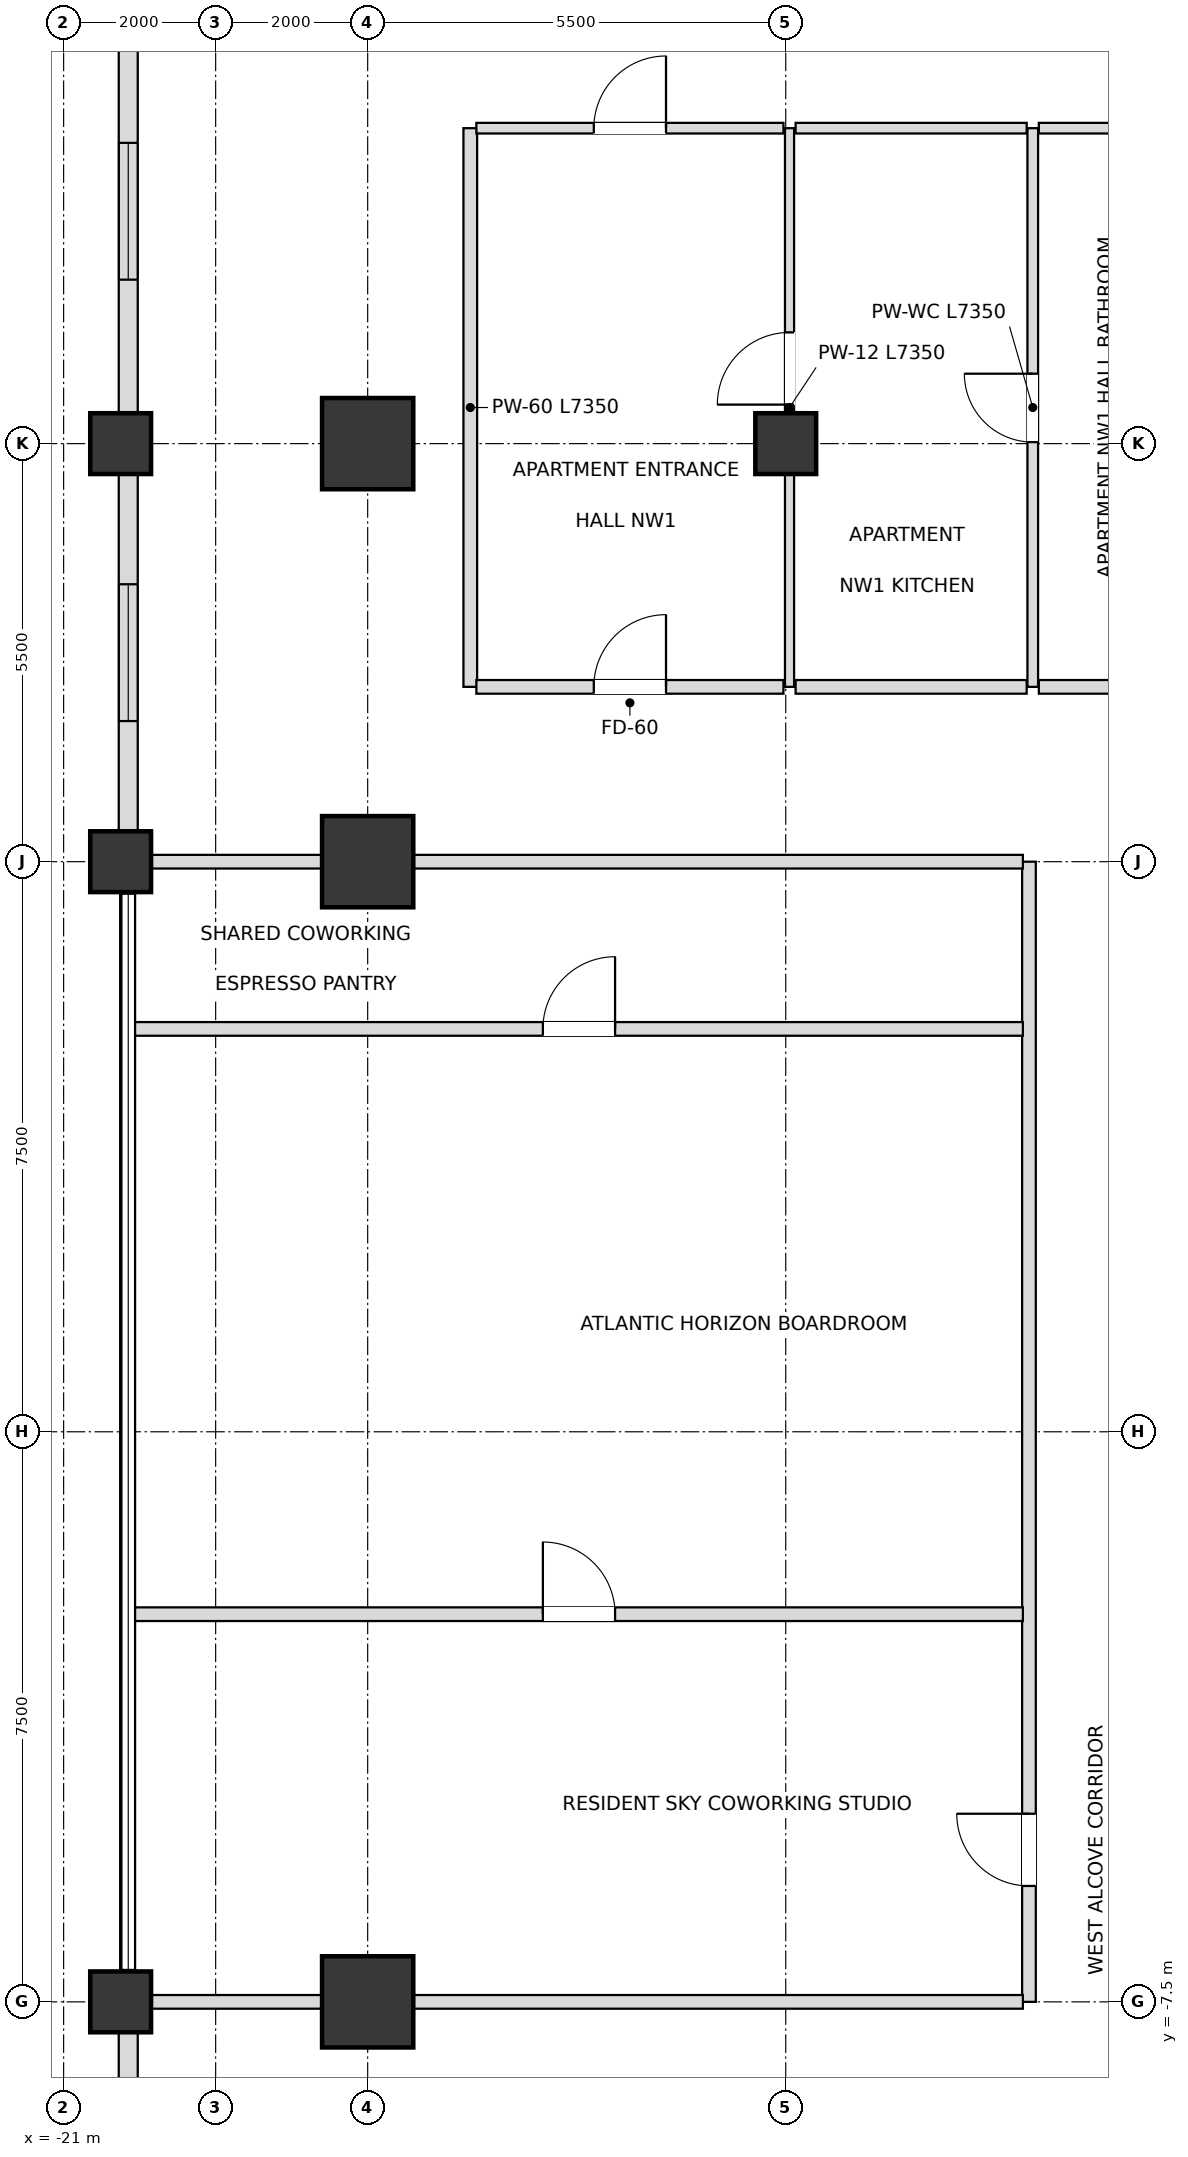
"""IFC4 building model, lengths in metres.
Left out: names, types, materials, properties, quantities, classifications, styles, units other than length and angle.
Written with IfcOpenShell. Run it as: python <this file> out.ifc"""

import sys

from ifc_helpers import new_model, si_unit, direction, frame, frame_2d, origin, origin_2d, place, context, subcontext, project, spatial, rectangle, extrude, element, fill, save


model = new_model("IFC4")
c1 = context("Model", 3, precision=1e-05, world=origin(), true_north=direction((0.0, 1.0)))
c2 = subcontext(c1, "Body", "Model", "MODEL_VIEW")
j1 = project(units=[si_unit("LENGTHUNIT", "METRE"), si_unit("PLANEANGLEUNIT", "RADIAN")], contexts=[c1])
p1 = place(None, origin())
s1 = spatial("IfcSite", under=j1, at=p1, CompositionType="ELEMENT")
p2 = place(p1, origin())
s2 = spatial("IfcBuilding", under=s1, at=p2, CompositionType="ELEMENT")
p3 = place(p2, frame((0.0, 0.0, 147.6)))
s3 = spatial("IfcBuildingStorey", under=s2, at=p3, CompositionType="ELEMENT", Elevation=147.6)
for number, where, z_axis, x_axis in (
    (1, (-17.0, 13.0, 0.0), (0.0, 0.0, 1.0), (1.0, 0.0, 0.0)),
    (2, (-17.0, 7.5, 0.0), (0.0, 0.0, 1.0), (1.0, 0.0, 0.0)),
    (3, (-17.0, -7.5, 0.0), (0.0, 0.0, 1.0), (1.0, 0.0, 0.0)),
):
    element("IfcColumn", number, at=place(p3, frame(where, z_axis=z_axis, x_axis=x_axis)), inside=s3, PredefinedType="USERDEFINED", context=c2, shape_type="SweptSolid", body=[
        extrude(rectangle(XDim=1.2, YDim=1.2, at=origin_2d()), origin(), (0.0, 0.0, 1.0), 3.6),
    ])
for number, where, z_axis, x_axis in (
    (4, (-11.5, 13.0, 0.0), (0.0, 0.0, 1.0), (1.0, 0.0, 0.0)),
    (5, (-20.25, -7.5, 0.0), (0.0, 0.0, 1.0), (1.0, 0.0, 0.0)),
    (6, (-20.25, 7.5, 0.0), (0.0, 0.0, 1.0), (1.0, 0.0, 0.0)),
    (7, (-20.25, 13.0, 0.0), (0.0, 0.0, 1.0), (1.0, 0.0, 0.0)),
):
    element("IfcColumn", number, at=place(p3, frame(where, z_axis=z_axis, x_axis=x_axis)), inside=s3, PredefinedType="COLUMN", context=c2, shape_type="SweptSolid", body=[
        extrude(rectangle(XDim=0.8, YDim=0.8, at=origin_2d()), origin(), (0.0, 0.0, 1.0), 3.6),
    ])
p4 = place(p3, frame((-20.15, 18.675, 0.0), z_axis=(0.0, 0.0, 1.0), x_axis=(0.0, -1.0, 0.0)))
e8 = element("IfcWall", 8, at=p4, inside=s3, PredefinedType="SOLIDWALL", context=c2, shape_type="SweptSolid", body=[
    extrude(rectangle(XDim=5.28, YDim=0.25, at=frame_2d((2.64, 0.0))), origin(), (0.0, 0.0, 1.0), 2.736),
])
p5 = place(p4, frame((1.718, 0.0, 0.72)))
e9 = element("IfcOpeningElement", 9, at=p5, cuts=e8, PredefinedType="OPENING", context=c2, shape_type="SweptSolid", body=[
    extrude(rectangle(XDim=1.8, YDim=1.68, at=frame_2d((0.9, 0.84))), frame((0.0, 0.135, 0.0), z_axis=(0.0, -1.0, 0.0), x_axis=(1.0, 0.0, 0.0)), (0.0, 0.0, 1.0), 0.27),
])
p6 = place(p3, frame((-20.15, 12.605, 0.0), z_axis=(0.0, 0.0, 1.0), x_axis=(0.0, -1.0, 0.0)))
e10 = element("IfcWall", 10, at=p6, inside=s3, PredefinedType="SOLIDWALL", context=c2, shape_type="SweptSolid", body=[
    extrude(rectangle(XDim=4.71, YDim=0.25, at=frame_2d((2.355, 0.0))), origin(), (0.0, 0.0, 1.0), 2.736),
])
p7 = place(p6, frame((1.455, 0.0, 0.72)))
e11 = element("IfcOpeningElement", 11, at=p7, cuts=e10, PredefinedType="OPENING", context=c2, shape_type="SweptSolid", body=[
    extrude(rectangle(XDim=1.8, YDim=1.68, at=frame_2d((0.9, 0.84))), frame((0.0, 0.135, 0.0), z_axis=(0.0, -1.0, 0.0), x_axis=(1.0, 0.0, 0.0)), (0.0, 0.0, 1.0), 0.27),
])
p8 = place(p3, frame((-20.15, -7.895, 0.0), z_axis=(0.0, 0.0, 1.0), x_axis=(0.0, -1.0, 0.0)))
e12 = element("IfcWall", 12, at=p8, inside=s3, PredefinedType="SOLIDWALL", context=c2, shape_type="SweptSolid", body=[
    extrude(rectangle(XDim=4.71, YDim=0.25, at=frame_2d((2.355, 0.0))), origin(), (0.0, 0.0, 1.0), 2.736),
])
p9 = place(p8, frame((1.455, 0.0, 0.72)))
e13 = element("IfcOpeningElement", 13, at=p9, cuts=e12, PredefinedType="OPENING", context=c2, shape_type="SweptSolid", body=[
    extrude(rectangle(XDim=1.8, YDim=1.68, at=frame_2d((0.9, 0.84))), frame((0.0, 0.135, 0.0), z_axis=(0.0, -1.0, 0.0), x_axis=(1.0, 0.0, 0.0)), (0.0, 0.0, 1.0), 0.27),
])
p10 = place(p3, frame((-15.65, 9.8, 0.0), z_axis=(0.0, 0.0, 1.0), x_axis=(0.0, 1.0, 0.0)))
e14 = element("IfcWall", 14, at=p10, inside=s3, PredefinedType="PARTITIONING", context=c2, shape_type="SweptSolid", body=[
    extrude(rectangle(XDim=7.35, YDim=0.18, at=frame_2d((3.675, 0.0))), origin(), (0.0, 0.0, 1.0), 2.736),
])
p11 = place(p3, frame((-11.45, 9.8, 0.0), z_axis=(0.0, 0.0, 1.0), x_axis=(0.0, 1.0, 0.0)))
e15 = element("IfcWall", 15, at=p11, inside=s3, PredefinedType="PARTITIONING", context=c2, shape_type="SweptSolid", body=[
    extrude(rectangle(XDim=7.35, YDim=0.12, at=frame_2d((3.675, 0.0))), origin(), (0.0, 0.0, 1.0), 2.736),
])
p12 = place(p11, frame((3.713, 0.0, 0.0)))
e16 = element("IfcOpeningElement", 16, at=p12, cuts=e15, PredefinedType="OPENING", context=c2, shape_type="SweptSolid", body=[
    extrude(rectangle(XDim=0.95, YDim=2.1, at=frame_2d((0.475, 1.05))), frame((0.0, 0.07, 0.0), z_axis=(0.0, -1.0, 0.0), x_axis=(1.0, 0.0, 0.0)), (0.0, 0.0, 1.0), 0.14),
])
p13 = place(p3, frame((-8.3, -7.5, 0.0), z_axis=(0.0, 0.0, 1.0), x_axis=(0.0, 1.0, 0.0)))
e17 = element("IfcWall", 17, at=p13, inside=s3, PredefinedType="PARTITIONING", context=c2, shape_type="SweptSolid", body=[
    extrude(rectangle(XDim=15.0, YDim=0.18, at=frame_2d((7.5, 0.0))), origin(), (0.0, 0.0, 1.0), 3.38),
])
p14 = place(p13, frame((1.525, 0.0, 0.0)))
e18 = element("IfcOpeningElement", 18, at=p14, cuts=e17, PredefinedType="OPENING", context=c2, shape_type="SweptSolid", body=[
    extrude(rectangle(XDim=0.95, YDim=2.15, at=frame_2d((0.475, 1.075))), frame((0.0, 0.1, 0.0), z_axis=(0.0, -1.0, 0.0), x_axis=(1.0, 0.0, 0.0)), (0.0, 0.0, 1.0), 0.2),
])
p15 = place(p3, frame((-8.25, 9.8, 0.0), z_axis=(0.0, 0.0, 1.0), x_axis=(0.0, 1.0, 0.0)))
e19 = element("IfcWall", 19, at=p15, inside=s3, PredefinedType="PARTITIONING", context=c2, shape_type="SweptSolid", body=[
    extrude(rectangle(XDim=7.35, YDim=0.14, at=frame_2d((3.675, 0.0))), origin(), (0.0, 0.0, 1.0), 2.816),
])
p16 = place(p15, frame((3.22, 0.0, 0.0)))
e20 = element("IfcOpeningElement", 20, at=p16, cuts=e19, PredefinedType="OPENING", context=c2, shape_type="SweptSolid", body=[
    extrude(rectangle(XDim=0.9, YDim=2.1, at=frame_2d((0.45, 1.05))), frame((0.0, 0.08, 0.0), z_axis=(0.0, -1.0, 0.0), x_axis=(1.0, 0.0, 0.0)), (0.0, 0.0, 1.0), 0.16),
])
p17 = place(p3, frame((-20.15, -7.5, 0.0), z_axis=(0.0, 0.0, 1.0), x_axis=(1.0, 0.0, 0.0)))
e21 = element("IfcWall", 21, at=p17, inside=s3, PredefinedType="PARTITIONING", context=c2, shape_type="SweptSolid", body=[
    extrude(rectangle(XDim=11.77, YDim=0.18, at=frame_2d((5.885, 0.0))), origin(), (0.0, 0.0, 1.0), 2.816),
])
p18 = place(p3, frame((-20.07, -2.4, 0.0), z_axis=(0.0, 0.0, 1.0), x_axis=(1.0, 0.0, 0.0)))
e22 = element("IfcWall", 22, at=p18, inside=s3, PredefinedType="PARTITIONING", context=c2, shape_type="SweptSolid", body=[
    extrude(rectangle(XDim=11.69, YDim=0.18, at=frame_2d((5.845, 0.0))), origin(), (0.0, 0.0, 1.0), 2.816),
])
p19 = place(p18, frame((5.375, 0.0, 0.0)))
e23 = element("IfcOpeningElement", 23, at=p19, cuts=e22, PredefinedType="OPENING", context=c2, shape_type="SweptSolid", body=[
    extrude(rectangle(XDim=0.95, YDim=2.15, at=frame_2d((0.475, 1.075))), frame((0.0, 0.1, 0.0), z_axis=(0.0, -1.0, 0.0), x_axis=(1.0, 0.0, 0.0)), (0.0, 0.0, 1.0), 0.2),
])
p20 = place(p3, frame((-20.07, 5.3, 0.0), z_axis=(0.0, 0.0, 1.0), x_axis=(1.0, 0.0, 0.0)))
e24 = element("IfcWall", 24, at=p20, inside=s3, PredefinedType="PARTITIONING", context=c2, shape_type="SweptSolid", body=[
    extrude(rectangle(XDim=11.69, YDim=0.18, at=frame_2d((5.845, 0.0))), origin(), (0.0, 0.0, 1.0), 2.816),
])
p21 = place(p20, frame((5.375, 0.0, 0.0)))
e25 = element("IfcOpeningElement", 25, at=p21, cuts=e24, PredefinedType="OPENING", context=c2, shape_type="SweptSolid", body=[
    extrude(rectangle(XDim=0.95, YDim=2.15, at=frame_2d((0.475, 1.075))), frame((0.0, 0.1, 0.0), z_axis=(0.0, -1.0, 0.0), x_axis=(1.0, 0.0, 0.0)), (0.0, 0.0, 1.0), 0.2),
])
p22 = place(p3, frame((-20.15, 7.5, 0.0), z_axis=(0.0, 0.0, 1.0), x_axis=(1.0, 0.0, 0.0)))
e26 = element("IfcWall", 26, at=p22, inside=s3, PredefinedType="PARTITIONING", context=c2, shape_type="SweptSolid", body=[
    extrude(rectangle(XDim=11.77, YDim=0.18, at=frame_2d((5.885, 0.0))), origin(), (0.0, 0.0, 1.0), 2.816),
])
p23 = place(p3, frame((-15.57, 9.8, 0.0), z_axis=(0.0, 0.0, 1.0), x_axis=(1.0, 0.0, 0.0)))
e27 = element("IfcWall", 27, at=p23, inside=s3, PredefinedType="PARTITIONING", context=c2, shape_type="SweptSolid", body=[
    extrude(rectangle(XDim=4.04, YDim=0.18, at=frame_2d((2.02, 0.0))), origin(), (0.0, 0.0, 1.0), 3.38),
])
p24 = place(p23, frame((1.545, 0.0, 0.0)))
e28 = element("IfcOpeningElement", 28, at=p24, cuts=e27, PredefinedType="OPENING", context=c2, shape_type="SweptSolid", body=[
    extrude(rectangle(XDim=0.95, YDim=2.15, at=frame_2d((0.475, 1.075))), frame((0.0, 0.1, 0.0), z_axis=(0.0, -1.0, 0.0), x_axis=(1.0, 0.0, 0.0)), (0.0, 0.0, 1.0), 0.2),
])
p25 = place(p3, frame((-11.37, 9.8, 0.0), z_axis=(0.0, 0.0, 1.0), x_axis=(1.0, 0.0, 0.0)))
e29 = element("IfcWall", 29, at=p25, inside=s3, PredefinedType="PARTITIONING", context=c2, shape_type="SweptSolid", body=[
    extrude(rectangle(XDim=3.04, YDim=0.18, at=frame_2d((1.52, 0.0))), origin(), (0.0, 0.0, 1.0), 3.38),
])
p26 = place(p3, frame((-8.17, 9.8, 0.0), z_axis=(0.0, 0.0, 1.0), x_axis=(1.0, 0.0, 0.0)))
e30 = element("IfcWall", 30, at=p26, inside=s3, PredefinedType="PARTITIONING", context=c2, shape_type="SweptSolid", body=[
    extrude(rectangle(XDim=1.79, YDim=0.18, at=frame_2d((0.895, 0.0))), origin(), (0.0, 0.0, 1.0), 2.816),
])
p27 = place(p3, frame((-15.57, 17.15, 0.0), z_axis=(0.0, 0.0, 1.0), x_axis=(1.0, 0.0, 0.0)))
e31 = element("IfcWall", 31, at=p27, inside=s3, PredefinedType="PARTITIONING", context=c2, shape_type="SweptSolid", body=[
    extrude(rectangle(XDim=4.04, YDim=0.14, at=frame_2d((2.02, 0.0))), origin(), (0.0, 0.0, 1.0), 2.736),
])
p28 = place(p27, frame((1.545, 0.0, 0.0)))
e32 = element("IfcOpeningElement", 32, at=p28, cuts=e31, PredefinedType="OPENING", context=c2, shape_type="SweptSolid", body=[
    extrude(rectangle(XDim=0.95, YDim=2.1, at=frame_2d((0.475, 1.05))), frame((0.0, 0.08, 0.0), z_axis=(0.0, -1.0, 0.0), x_axis=(1.0, 0.0, 0.0)), (0.0, 0.0, 1.0), 0.16),
])
p29 = place(p3, frame((-11.37, 17.15, 0.0), z_axis=(0.0, 0.0, 1.0), x_axis=(1.0, 0.0, 0.0)))
e33 = element("IfcWall", 33, at=p29, inside=s3, PredefinedType="PARTITIONING", context=c2, shape_type="SweptSolid", body=[
    extrude(rectangle(XDim=3.04, YDim=0.14, at=frame_2d((1.52, 0.0))), origin(), (0.0, 0.0, 1.0), 3.38),
])
p30 = place(p3, frame((-8.17, 17.15, 0.0), z_axis=(0.0, 0.0, 1.0), x_axis=(1.0, 0.0, 0.0)))
e34 = element("IfcWall", 34, at=p30, inside=s3, PredefinedType="PARTITIONING", context=c2, shape_type="SweptSolid", body=[
    extrude(rectangle(XDim=1.79, YDim=0.14, at=frame_2d((0.895, 0.0))), origin(), (0.0, 0.0, 1.0), 2.816),
])
p31 = place(p5, origin())
e35 = element("IfcWindow", 35, at=p31, inside=s3, PartitioningType="SINGLE_PANEL", PredefinedType="WINDOW", context=c2, shape_type="SweptSolid", body=[
    extrude(rectangle(XDim=1.8, YDim=1.68, at=frame_2d((0.9, 0.84))), frame((0.0, 0.03, 0.0), z_axis=(0.0, -1.0, 0.0), x_axis=(1.0, 0.0, 0.0)), (0.0, 0.0, 1.0), 0.06),
])
fill(e9, e35)
p32 = place(p7, origin())
e36 = element("IfcWindow", 36, at=p32, inside=s3, PartitioningType="SINGLE_PANEL", PredefinedType="WINDOW", context=c2, shape_type="SweptSolid", body=[
    extrude(rectangle(XDim=1.8, YDim=1.68, at=frame_2d((0.9, 0.84))), frame((0.0, 0.03, 0.0), z_axis=(0.0, -1.0, 0.0), x_axis=(1.0, 0.0, 0.0)), (0.0, 0.0, 1.0), 0.06),
])
fill(e11, e36)
p33 = place(p24, origin())
e37 = element("IfcDoor", 37, at=p33, inside=s3, OperationType="SINGLE_SWING_RIGHT", PredefinedType="DOOR", context=c2, shape_type="SweptSolid", body=[
    extrude(rectangle(XDim=0.95, YDim=2.15, at=frame_2d((0.475, 1.075))), frame((0.0, 0.025, 0.0), z_axis=(0.0, -1.0, 0.0), x_axis=(1.0, 0.0, 0.0)), (0.0, 0.0, 1.0), 0.05),
])
fill(e28, e37)
p34 = place(p12, origin())
e38 = element("IfcDoor", 38, at=p34, inside=s3, OperationType="SINGLE_SWING_LEFT", PredefinedType="DOOR", context=c2, shape_type="SweptSolid", body=[
    extrude(rectangle(XDim=0.95, YDim=2.1, at=frame_2d((0.475, 1.05))), frame((0.0, 0.025, 0.0), z_axis=(0.0, -1.0, 0.0), x_axis=(1.0, 0.0, 0.0)), (0.0, 0.0, 1.0), 0.05),
])
fill(e16, e38)
p35 = place(p16, origin())
e39 = element("IfcDoor", 39, at=p35, inside=s3, OperationType="SINGLE_SWING_RIGHT", PredefinedType="DOOR", context=c2, shape_type="SweptSolid", body=[
    extrude(rectangle(XDim=0.9, YDim=2.1, at=frame_2d((0.45, 1.05))), frame((0.0, 0.025, 0.0), z_axis=(0.0, -1.0, 0.0), x_axis=(1.0, 0.0, 0.0)), (0.0, 0.0, 1.0), 0.05),
])
fill(e20, e39)
p36 = place(p28, origin())
e40 = element("IfcDoor", 40, at=p36, inside=s3, OperationType="SINGLE_SWING_RIGHT", PredefinedType="DOOR", context=c2, shape_type="SweptSolid", body=[
    extrude(rectangle(XDim=0.95, YDim=2.1, at=frame_2d((0.475, 1.05))), frame((0.0, 0.025, 0.0), z_axis=(0.0, -1.0, 0.0), x_axis=(1.0, 0.0, 0.0)), (0.0, 0.0, 1.0), 0.05),
])
fill(e32, e40)
p37 = place(p14, origin())
e41 = element("IfcDoor", 41, at=p37, inside=s3, OperationType="SINGLE_SWING_RIGHT", PredefinedType="DOOR", context=c2, shape_type="SweptSolid", body=[
    extrude(rectangle(XDim=0.95, YDim=2.15, at=frame_2d((0.475, 1.075))), frame((0.0, 0.025, 0.0), z_axis=(0.0, -1.0, 0.0), x_axis=(1.0, 0.0, 0.0)), (0.0, 0.0, 1.0), 0.05),
])
fill(e18, e41)
p38 = place(p19, origin())
e42 = element("IfcDoor", 42, at=p38, inside=s3, OperationType="SINGLE_SWING_LEFT", PredefinedType="DOOR", context=c2, shape_type="SweptSolid", body=[
    extrude(rectangle(XDim=0.95, YDim=2.15, at=frame_2d((0.475, 1.075))), frame((0.0, 0.025, 0.0), z_axis=(0.0, -1.0, 0.0), x_axis=(1.0, 0.0, 0.0)), (0.0, 0.0, 1.0), 0.05),
])
fill(e23, e42)
p39 = place(p21, origin())
e43 = element("IfcDoor", 43, at=p39, inside=s3, OperationType="SINGLE_SWING_RIGHT", PredefinedType="DOOR", context=c2, shape_type="SweptSolid", body=[
    extrude(rectangle(XDim=0.95, YDim=2.15, at=frame_2d((0.475, 1.075))), frame((0.0, 0.025, 0.0), z_axis=(0.0, -1.0, 0.0), x_axis=(1.0, 0.0, 0.0)), (0.0, 0.0, 1.0), 0.05),
])
fill(e25, e43)
save(model, sys.argv[1])
